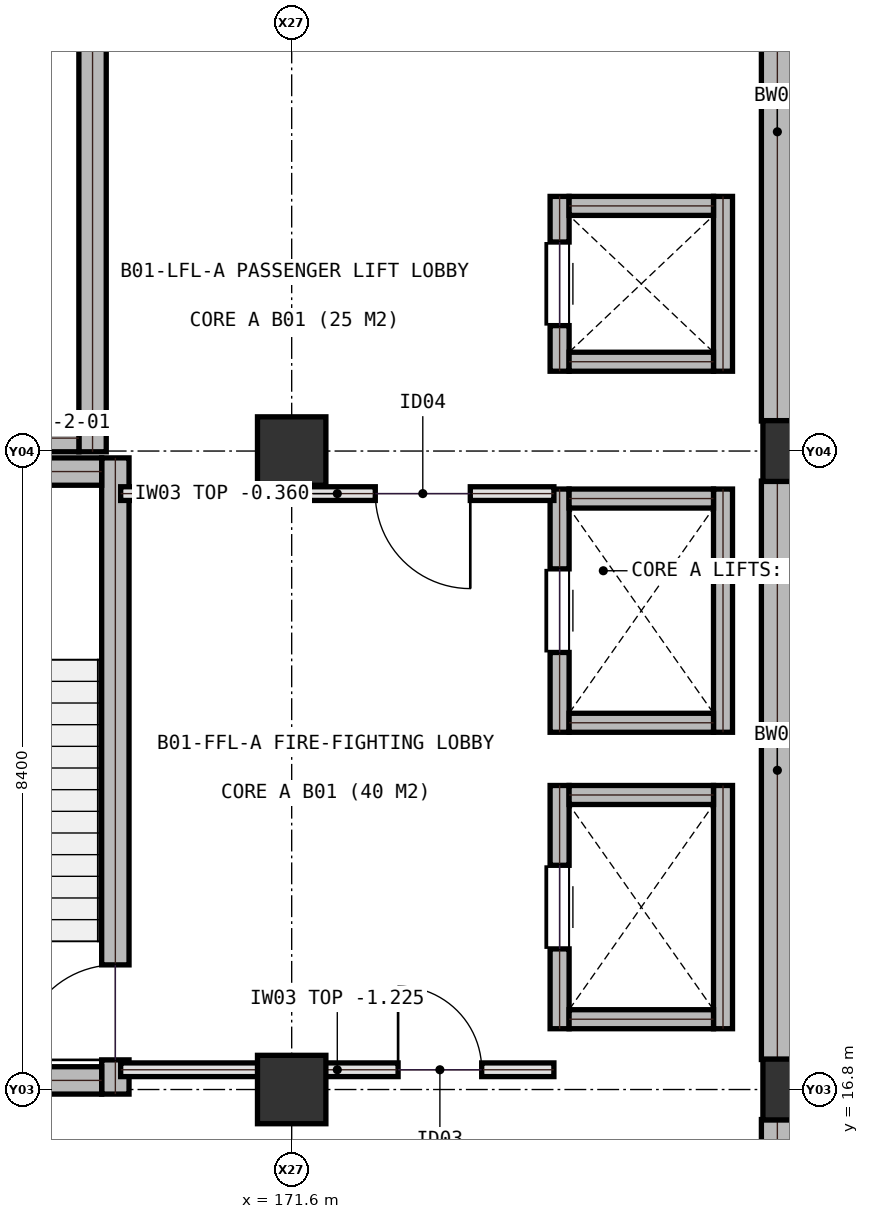
"""IFC4 building model, lengths in metres.
Left out: names, types, materials, properties, quantities, classifications, styles, units other than length and angle.
Written with IfcOpenShell. Run it as: python <this file> out.ifc"""

import sys

from ifc_helpers import new_model, si_unit, direction, frame, frame_2d, origin, origin_2d, place, context, subcontext, project, spatial, rectangle, extrude, element, fill, save


model = new_model("IFC4")
c1 = context("Model", 3, precision=1e-05, world=origin(), true_north=direction((0.0, 1.0)))
c2 = subcontext(c1, "Body", "Model", "MODEL_VIEW")
j1 = project(units=[si_unit("LENGTHUNIT", "METRE"), si_unit("PLANEANGLEUNIT", "RADIAN")], contexts=[c1])
p1 = place(None, origin())
s1 = spatial("IfcSite", under=j1, at=p1, CompositionType="ELEMENT")
p2 = place(p1, origin())
s2 = spatial("IfcBuilding", under=s1, at=p2, CompositionType="ELEMENT")
p3 = place(p2, frame((0.0, 0.0, -4.5)))
s3 = spatial("IfcBuildingStorey", under=s2, at=p3, CompositionType="ELEMENT", Elevation=-4.5)
for number, where, z_axis, x_axis in (
    (1, (171.6, 16.8, 0.0), (0.0, 0.0, 1.0), (1.0, 0.0, 0.0)),
    (2, (171.6, 25.2, 0.0), (0.0, 0.0, 1.0), (1.0, 0.0, 0.0)),
):
    element("IfcColumn", number, at=place(p3, frame(where, z_axis=z_axis, x_axis=x_axis)), inside=s3, PredefinedType="COLUMN", context=c2, shape_type="SweptSolid", body=[
        extrude(rectangle(XDim=0.9, YDim=0.9, at=origin_2d()), origin(), (0.0, 0.0, 1.0), 4.5),
    ])
for number, where, z_axis, x_axis in (
    (3, (178.2, 16.8, 0.0), (0.0, 0.0, 1.0), (1.0, 0.0, 0.0)),
    (4, (178.2, 25.2, 0.0), (0.0, 0.0, 1.0), (1.0, 0.0, 0.0)),
):
    element("IfcColumn", number, at=place(p3, frame(where, z_axis=z_axis, x_axis=x_axis)), inside=s3, PredefinedType="COLUMN", context=c2, shape_type="SweptSolid", body=[
        extrude(rectangle(XDim=0.8, YDim=0.8, at=origin_2d()), origin(), (0.0, 0.0, 1.0), 4.5),
    ])
p4 = place(p3, frame((177.99, 8.795, 0.0), z_axis=(0.0, 0.0, 1.0), x_axis=(0.0, 1.0, 0.0)))
e5 = element("IfcWall", 5, at=p4, inside=s3, PredefinedType="SOLIDWALL", context=c2, shape_type="SweptSolid", body=[
    extrude(rectangle(XDim=7.61, YDim=0.42, at=frame_2d((3.805, 0.0))), origin(), (0.0, 0.0, 1.0), 4.14),
])
p5 = place(p3, frame((177.99, 17.195, 0.0), z_axis=(0.0, 0.0, 1.0), x_axis=(0.0, 1.0, 0.0)))
e6 = element("IfcWall", 6, at=p5, inside=s3, PredefinedType="SOLIDWALL", context=c2, shape_type="SweptSolid", body=[
    extrude(rectangle(XDim=7.61, YDim=0.42, at=frame_2d((3.805, 0.0))), origin(), (0.0, 0.0, 1.0), 4.14),
])
p6 = place(p3, frame((177.99, 25.595, 0.0), z_axis=(0.0, 0.0, 1.0), x_axis=(0.0, 1.0, 0.0)))
e7 = element("IfcWall", 7, at=p6, inside=s3, PredefinedType="SOLIDWALL", context=c2, shape_type="SweptSolid", body=[
    extrude(rectangle(XDim=7.61, YDim=0.42, at=frame_2d((3.805, 0.0))), origin(), (0.0, 0.0, 1.0), 4.14),
])
p7 = place(p3, frame((169.28, 16.74, 0.0), z_axis=(0.0, 0.0, 1.0), x_axis=(0.0, 1.0, 0.0)))
e8 = element("IfcWall", 8, at=p7, inside=s3, PredefinedType="SHEAR", context=c2, shape_type="SweptSolid", body=[
    extrude(rectangle(XDim=8.37, YDim=0.36, at=frame_2d((4.185, 0.0))), origin(), (0.0, 0.0, 1.0), 4.14),
])
p8 = place(p7, frame((0.45, 0.0, 0.0)))
e9 = element("IfcOpeningElement", 9, at=p8, cuts=e8, PredefinedType="OPENING", context=c2, shape_type="SweptSolid", body=[
    extrude(rectangle(XDim=1.25, YDim=2.15, at=frame_2d((0.625, 1.075))), frame((0.0, 0.19, 0.0), z_axis=(0.0, -1.0, 0.0), x_axis=(1.0, 0.0, 0.0)), (0.0, 0.0, 1.0), 0.38),
])
for number, where, z_axis, x_axis in (
    (10, (165.6, 24.93, 0.0), (0.0, 0.0, 1.0), (1.0, 0.0, 0.0)),
    (11, (165.6, 16.92, 0.0), (0.0, 0.0, 1.0), (1.0, 0.0, 0.0)),
):
    element("IfcWall", number, at=place(p3, frame(where, z_axis=z_axis, x_axis=x_axis)), inside=s3, PredefinedType="SHEAR", context=c2, shape_type="SweptSolid", body=[
        extrude(rectangle(XDim=3.5, YDim=0.36, at=frame_2d((1.75, 0.0))), origin(), (0.0, 0.0, 1.0), 4.14),
    ])
p9 = place(p3, frame((168.98, 25.19, 0.0), z_axis=(0.0, 0.0, 1.0), x_axis=(0.0, 1.0, 0.0)))
e12 = element("IfcWall", 12, at=p9, inside=s3, PredefinedType="SHEAR", context=c2, shape_type="SweptSolid", body=[
    extrude(rectangle(XDim=8.17, YDim=0.36, at=frame_2d((4.085, 0.0))), origin(), (0.0, 0.0, 1.0), 4.14),
])
p10 = place(p3, frame((165.6, 25.37, 0.0), z_axis=(0.0, 0.0, 1.0), x_axis=(1.0, 0.0, 0.0)))
e13 = element("IfcWall", 13, at=p10, inside=s3, PredefinedType="SHEAR", context=c2, shape_type="SweptSolid", body=[
    extrude(rectangle(XDim=3.2, YDim=0.36, at=frame_2d((1.6, 0.0))), origin(), (0.0, 0.0, 1.0), 4.14),
])
p11 = place(p3, frame((175.125, 17.6, 0.0), z_axis=(0.0, 0.0, 1.0), x_axis=(0.0, 1.0, 0.0)))
e14 = element("IfcWall", 14, at=p11, inside=s3, PredefinedType="SHEAR", context=c2, shape_type="SweptSolid", body=[
    extrude(rectangle(XDim=3.2, YDim=0.25, at=frame_2d((1.6, 0.0))), origin(), (0.0, 0.0, 1.0), 4.14),
])
p12 = place(p11, frame((1.05, 0.0, 0.0)))
e15 = element("IfcOpeningElement", 15, at=p12, cuts=e14, PredefinedType="OPENING", context=c2, shape_type="SweptSolid", body=[
    extrude(rectangle(XDim=1.1, YDim=2.15, at=frame_2d((0.55, 1.075))), frame((0.0, 0.135, 0.0), z_axis=(0.0, -1.0, 0.0), x_axis=(1.0, 0.0, 0.0)), (0.0, 0.0, 1.0), 0.27),
])
p13 = place(p3, frame((177.275, 17.6, 0.0), z_axis=(0.0, 0.0, 1.0), x_axis=(0.0, 1.0, 0.0)))
e16 = element("IfcWall", 16, at=p13, inside=s3, PredefinedType="SHEAR", context=c2, shape_type="SweptSolid", body=[
    extrude(rectangle(XDim=3.2, YDim=0.25, at=frame_2d((1.6, 0.0))), origin(), (0.0, 0.0, 1.0), 4.14),
])
for number, where, z_axis, x_axis in (
    (17, (175.25, 17.725, 0.0), (0.0, 0.0, 1.0), (1.0, 0.0, 0.0)),
    (18, (175.25, 20.675, 0.0), (0.0, 0.0, 1.0), (1.0, 0.0, 0.0)),
):
    element("IfcWall", number, at=place(p3, frame(where, z_axis=z_axis, x_axis=x_axis)), inside=s3, PredefinedType="SHEAR", context=c2, shape_type="SweptSolid", body=[
        extrude(rectangle(XDim=1.9, YDim=0.25, at=frame_2d((0.95, 0.0))), origin(), (0.0, 0.0, 1.0), 4.14),
    ])
p14 = place(p3, frame((175.125, 21.5, 0.0), z_axis=(0.0, 0.0, 1.0), x_axis=(0.0, 1.0, 0.0)))
e19 = element("IfcWall", 19, at=p14, inside=s3, PredefinedType="SHEAR", context=c2, shape_type="SweptSolid", body=[
    extrude(rectangle(XDim=3.2, YDim=0.25, at=frame_2d((1.6, 0.0))), origin(), (0.0, 0.0, 1.0), 4.14),
])
p15 = place(p14, frame((1.05, 0.0, 0.0)))
e20 = element("IfcOpeningElement", 20, at=p15, cuts=e19, PredefinedType="OPENING", context=c2, shape_type="SweptSolid", body=[
    extrude(rectangle(XDim=1.1, YDim=2.15, at=frame_2d((0.55, 1.075))), frame((0.0, 0.135, 0.0), z_axis=(0.0, -1.0, 0.0), x_axis=(1.0, 0.0, 0.0)), (0.0, 0.0, 1.0), 0.27),
])
p16 = place(p3, frame((177.275, 21.5, 0.0), z_axis=(0.0, 0.0, 1.0), x_axis=(0.0, 1.0, 0.0)))
e21 = element("IfcWall", 21, at=p16, inside=s3, PredefinedType="SHEAR", context=c2, shape_type="SweptSolid", body=[
    extrude(rectangle(XDim=3.2, YDim=0.25, at=frame_2d((1.6, 0.0))), origin(), (0.0, 0.0, 1.0), 4.14),
])
for number, where, z_axis, x_axis in (
    (22, (175.25, 21.625, 0.0), (0.0, 0.0, 1.0), (1.0, 0.0, 0.0)),
    (23, (175.25, 24.575, 0.0), (0.0, 0.0, 1.0), (1.0, 0.0, 0.0)),
):
    element("IfcWall", number, at=place(p3, frame(where, z_axis=z_axis, x_axis=x_axis)), inside=s3, PredefinedType="SHEAR", context=c2, shape_type="SweptSolid", body=[
        extrude(rectangle(XDim=1.9, YDim=0.25, at=frame_2d((0.95, 0.0))), origin(), (0.0, 0.0, 1.0), 4.14),
    ])
p17 = place(p3, frame((175.125, 26.25, 0.0), z_axis=(0.0, 0.0, 1.0), x_axis=(0.0, 1.0, 0.0)))
e24 = element("IfcWall", 24, at=p17, inside=s3, PredefinedType="SHEAR", context=c2, shape_type="SweptSolid", body=[
    extrude(rectangle(XDim=2.3, YDim=0.25, at=frame_2d((1.15, 0.0))), origin(), (0.0, 0.0, 1.0), 4.14),
])
p18 = place(p17, frame((0.6, 0.0, 0.0)))
e25 = element("IfcOpeningElement", 25, at=p18, cuts=e24, PredefinedType="OPENING", context=c2, shape_type="SweptSolid", body=[
    extrude(rectangle(XDim=1.1, YDim=2.15, at=frame_2d((0.55, 1.075))), frame((0.0, 0.135, 0.0), z_axis=(0.0, -1.0, 0.0), x_axis=(1.0, 0.0, 0.0)), (0.0, 0.0, 1.0), 0.27),
])
p19 = place(p3, frame((177.275, 26.25, 0.0), z_axis=(0.0, 0.0, 1.0), x_axis=(0.0, 1.0, 0.0)))
e26 = element("IfcWall", 26, at=p19, inside=s3, PredefinedType="SHEAR", context=c2, shape_type="SweptSolid", body=[
    extrude(rectangle(XDim=2.3, YDim=0.25, at=frame_2d((1.15, 0.0))), origin(), (0.0, 0.0, 1.0), 4.14),
])
for number, where, z_axis, x_axis in (
    (27, (175.25, 26.375, 0.0), (0.0, 0.0, 1.0), (1.0, 0.0, 0.0)),
    (28, (175.25, 28.425, 0.0), (0.0, 0.0, 1.0), (1.0, 0.0, 0.0)),
):
    element("IfcWall", number, at=place(p3, frame(where, z_axis=z_axis, x_axis=x_axis)), inside=s3, PredefinedType="SHEAR", context=c2, shape_type="SweptSolid", body=[
        extrude(rectangle(XDim=1.9, YDim=0.25, at=frame_2d((0.95, 0.0))), origin(), (0.0, 0.0, 1.0), 4.14),
    ])
p20 = place(p3, frame((169.35, 24.64, 0.0), z_axis=(0.0, 0.0, 1.0), x_axis=(1.0, 0.0, 0.0)))
e29 = element("IfcWall", 29, at=p20, inside=s3, PredefinedType="SOLIDWALL", context=c2, shape_type="SweptSolid", body=[
    extrude(rectangle(XDim=5.7, YDim=0.18, at=frame_2d((2.85, 0.0))), origin(), (0.0, 0.0, 1.0), 4.14),
])
p21 = place(p20, frame((3.35, 0.0, 0.0)))
e30 = element("IfcOpeningElement", 30, at=p21, cuts=e29, PredefinedType="OPENING", context=c2, shape_type="SweptSolid", body=[
    extrude(rectangle(XDim=1.25, YDim=2.15, at=frame_2d((0.625, 1.075))), frame((0.0, 0.1, 0.0), z_axis=(0.0, -1.0, 0.0), x_axis=(1.0, 0.0, 0.0)), (0.0, 0.0, 1.0), 0.2),
])
p22 = place(p3, frame((169.35, 17.06, 0.0), z_axis=(0.0, 0.0, 1.0), x_axis=(1.0, 0.0, 0.0)))
e31 = element("IfcWall", 31, at=p22, inside=s3, PredefinedType="SOLIDWALL", context=c2, shape_type="SweptSolid", body=[
    extrude(rectangle(XDim=5.7, YDim=0.18, at=frame_2d((2.85, 0.0))), origin(), (0.0, 0.0, 1.0), 3.275),
])
p23 = place(p22, frame((3.65, 0.0, 0.0)))
e32 = element("IfcOpeningElement", 32, at=p23, cuts=e31, PredefinedType="OPENING", context=c2, shape_type="SweptSolid", body=[
    extrude(rectangle(XDim=1.1, YDim=2.15, at=frame_2d((0.55, 1.075))), frame((0.0, 0.1, 0.0), z_axis=(0.0, -1.0, 0.0), x_axis=(1.0, 0.0, 0.0)), (0.0, 0.0, 1.0), 0.2),
])
p24 = place(p8, origin())
e33 = element("IfcDoor", 33, at=p24, inside=s3, OperationType="SINGLE_SWING_LEFT", PredefinedType="DOOR", context=c2, shape_type="SweptSolid", body=[
    extrude(rectangle(XDim=1.25, YDim=2.15, at=frame_2d((0.625, 1.075))), frame((0.0, 0.025, 0.0), z_axis=(0.0, -1.0, 0.0), x_axis=(1.0, 0.0, 0.0)), (0.0, 0.0, 1.0), 0.05),
])
fill(e9, e33)
p25 = place(p12, origin())
e34 = element("IfcDoor", 34, at=p25, inside=s3, OperationType="SLIDING_TO_LEFT", PredefinedType="DOOR", context=c2, shape_type="SweptSolid", body=[
    extrude(rectangle(XDim=1.1, YDim=2.15, at=frame_2d((0.55, 1.075))), frame((0.0, 0.025, 0.0), z_axis=(0.0, -1.0, 0.0), x_axis=(1.0, 0.0, 0.0)), (0.0, 0.0, 1.0), 0.05),
])
fill(e15, e34)
p26 = place(p15, origin())
e35 = element("IfcDoor", 35, at=p26, inside=s3, OperationType="SLIDING_TO_LEFT", PredefinedType="DOOR", context=c2, shape_type="SweptSolid", body=[
    extrude(rectangle(XDim=1.1, YDim=2.15, at=frame_2d((0.55, 1.075))), frame((0.0, 0.025, 0.0), z_axis=(0.0, -1.0, 0.0), x_axis=(1.0, 0.0, 0.0)), (0.0, 0.0, 1.0), 0.05),
])
fill(e20, e35)
p27 = place(p18, origin())
e36 = element("IfcDoor", 36, at=p27, inside=s3, OperationType="SLIDING_TO_LEFT", PredefinedType="DOOR", context=c2, shape_type="SweptSolid", body=[
    extrude(rectangle(XDim=1.1, YDim=2.15, at=frame_2d((0.55, 1.075))), frame((0.0, 0.025, 0.0), z_axis=(0.0, -1.0, 0.0), x_axis=(1.0, 0.0, 0.0)), (0.0, 0.0, 1.0), 0.05),
])
fill(e25, e36)
p28 = place(p21, frame((1.25, 0.0, 0.0), z_axis=(0.0, 0.0, 1.0), x_axis=(-1.0, 0.0, 0.0)))
e37 = element("IfcDoor", 37, at=p28, inside=s3, OperationType="SINGLE_SWING_RIGHT", PredefinedType="DOOR", context=c2, shape_type="SweptSolid", body=[
    extrude(rectangle(XDim=1.25, YDim=2.15, at=frame_2d((0.625, 1.075))), frame((0.0, 0.025, 0.0), z_axis=(0.0, -1.0, 0.0), x_axis=(1.0, 0.0, 0.0)), (0.0, 0.0, 1.0), 0.05),
])
fill(e30, e37)
p29 = place(p23, origin())
e38 = element("IfcDoor", 38, at=p29, inside=s3, OperationType="SINGLE_SWING_LEFT", PredefinedType="DOOR", context=c2, shape_type="SweptSolid", body=[
    extrude(rectangle(XDim=1.1, YDim=2.15, at=frame_2d((0.55, 1.075))), frame((0.0, 0.025, 0.0), z_axis=(0.0, -1.0, 0.0), x_axis=(1.0, 0.0, 0.0)), (0.0, 0.0, 1.0), 0.05),
])
fill(e32, e38)
save(model, sys.argv[1])
